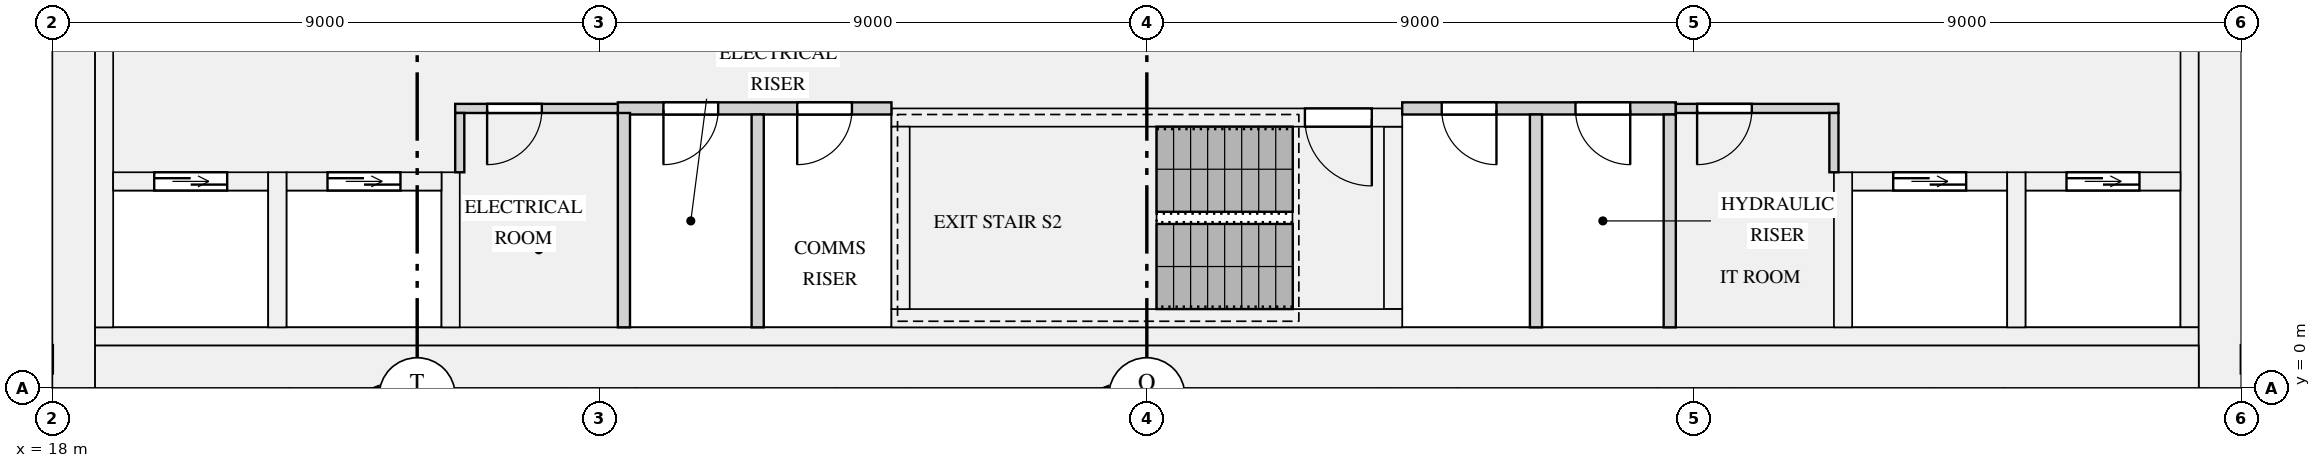
"""IFC4 building model, lengths in metres.
Left out: names, types, materials, properties, quantities, classifications, styles, units other than length and angle.
Written with IfcOpenShell. Run it as: python <this file> out.ifc"""

import sys

from ifc_helpers import new_model, si_unit, direction, frame, frame_2d, origin, place, context, subcontext, project, spatial, rectangle, extrude, element, fill, save


model = new_model("IFC4")
c1 = context("Model", 3, precision=1e-05, world=origin(), true_north=direction((0.0, 1.0)))
c2 = subcontext(c1, "Body", "Model", "MODEL_VIEW")
j1 = project(units=[si_unit("LENGTHUNIT", "METRE"), si_unit("PLANEANGLEUNIT", "RADIAN")], contexts=[c1])
p1 = place(None, origin())
s1 = spatial("IfcSite", under=j1, at=p1, CompositionType="ELEMENT")
p2 = place(p1, origin())
s2 = spatial("IfcBuilding", under=s1, at=p2, CompositionType="ELEMENT")
p3 = place(p2, frame((0.0, 0.0, 144.45)))
s3 = spatial("IfcBuildingStorey", under=s2, at=p3, CompositionType="ELEMENT", Elevation=144.45)
for number, where, z_axis, x_axis in (
    (1, (18.35, 0.0, 0.0), (0.0, 0.0, 1.0), (0.0, 1.0, 0.0)),
    (2, (53.65, 0.0, 0.0), (0.0, 0.0, 1.0), (0.0, 1.0, 0.0)),
):
    element("IfcWall", number, at=place(p3, frame(where, z_axis=z_axis, x_axis=x_axis)), inside=s3, PredefinedType="SHEAR", context=c2, shape_type="SweptSolid", body=[
        extrude(rectangle(XDim=12.5, YDim=0.7, at=frame_2d((6.25, 0.0))), origin(), (0.0, 0.0, 1.0), 3.15),
    ])
p4 = place(p3, frame((18.7, 0.35, 0.0), z_axis=(0.0, 0.0, 1.0), x_axis=(1.0, 0.0, 0.0)))
e3 = element("IfcWall", 3, at=p4, inside=s3, PredefinedType="SHEAR", context=c2, shape_type="SweptSolid", body=[
    extrude(rectangle(XDim=34.6, YDim=0.7, at=frame_2d((17.3, 0.0))), origin(), (0.0, 0.0, 1.0), 3.15),
])
for number, where, z_axis, x_axis in (
    (4, (18.85, 1.0, 0.0), (0.0, 0.0, 1.0), (0.0, 1.0, 0.0)),
    (5, (53.15, 1.0, 0.0), (0.0, 0.0, 1.0), (0.0, 1.0, 0.0)),
):
    element("IfcWall", number, at=place(p3, frame(where, z_axis=z_axis, x_axis=x_axis)), inside=s3, PredefinedType="SHEAR", context=c2, shape_type="SweptSolid", body=[
        extrude(rectangle(XDim=10.9, YDim=0.3, at=frame_2d((5.45, 0.0))), origin(), (0.0, 0.0, 1.0), 3.15),
    ])
p5 = place(p3, frame((18.7, 0.85, 0.0), z_axis=(0.0, 0.0, 1.0), x_axis=(1.0, 0.0, 0.0)))
e6 = element("IfcWall", 6, at=p5, inside=s3, PredefinedType="SHEAR", context=c2, shape_type="SweptSolid", body=[
    extrude(rectangle(XDim=34.6, YDim=0.3, at=frame_2d((17.3, 0.0))), origin(), (0.0, 0.0, 1.0), 3.15),
])
p6 = place(p3, frame((19.0, 3.4, 0.0), z_axis=(0.0, 0.0, 1.0), x_axis=(1.0, 0.0, 0.0)))
e7 = element("IfcWall", 7, at=p6, inside=s3, PredefinedType="SHEAR", context=c2, shape_type="SweptSolid", body=[
    extrude(rectangle(XDim=2.55, YDim=0.3, at=frame_2d((1.275, 0.0))), origin(), (0.0, 0.0, 1.0), 3.15),
])
p7 = place(p6, frame((0.675, 0.0, 0.0)))
e8 = element("IfcOpeningElement", 8, at=p7, cuts=e7, PredefinedType="OPENING", context=c2, shape_type="SweptSolid", body=[
    extrude(rectangle(XDim=1.2, YDim=2.1, at=frame_2d((0.6, 1.05))), frame((0.0, 0.16, 0.0), z_axis=(0.0, -1.0, 0.0), x_axis=(1.0, 0.0, 0.0)), (0.0, 0.0, 1.0), 0.32),
])
p8 = place(p3, frame((21.85, 3.4, 0.0), z_axis=(0.0, 0.0, 1.0), x_axis=(1.0, 0.0, 0.0)))
e9 = element("IfcWall", 9, at=p8, inside=s3, PredefinedType="SHEAR", context=c2, shape_type="SweptSolid", body=[
    extrude(rectangle(XDim=2.55, YDim=0.3, at=frame_2d((1.275, 0.0))), origin(), (0.0, 0.0, 1.0), 3.15),
])
p9 = place(p8, frame((0.675, 0.0, 0.0)))
e10 = element("IfcOpeningElement", 10, at=p9, cuts=e9, PredefinedType="OPENING", context=c2, shape_type="SweptSolid", body=[
    extrude(rectangle(XDim=1.2, YDim=2.1, at=frame_2d((0.6, 1.05))), frame((0.0, 0.16, 0.0), z_axis=(0.0, -1.0, 0.0), x_axis=(1.0, 0.0, 0.0)), (0.0, 0.0, 1.0), 0.32),
])
for number, where, z_axis, x_axis in (
    (11, (21.7, 1.0, 0.0), (0.0, 0.0, 1.0), (0.0, 1.0, 0.0)),
    (12, (24.55, 1.0, 0.0), (0.0, 0.0, 1.0), (0.0, 1.0, 0.0)),
):
    element("IfcWall", number, at=place(p3, frame(where, z_axis=z_axis, x_axis=x_axis)), inside=s3, PredefinedType="SHEAR", context=c2, shape_type="SweptSolid", body=[
        extrude(rectangle(XDim=2.55, YDim=0.3, at=frame_2d((1.275, 0.0))), origin(), (0.0, 0.0, 1.0), 3.15),
    ])
p10 = place(p3, frame((47.6, 3.4, 0.0), z_axis=(0.0, 0.0, 1.0), x_axis=(1.0, 0.0, 0.0)))
e13 = element("IfcWall", 13, at=p10, inside=s3, PredefinedType="SHEAR", context=c2, shape_type="SweptSolid", body=[
    extrude(rectangle(XDim=2.55, YDim=0.3, at=frame_2d((1.275, 0.0))), origin(), (0.0, 0.0, 1.0), 3.15),
])
p11 = place(p10, frame((0.675, 0.0, 0.0)))
e14 = element("IfcOpeningElement", 14, at=p11, cuts=e13, PredefinedType="OPENING", context=c2, shape_type="SweptSolid", body=[
    extrude(rectangle(XDim=1.2, YDim=2.1, at=frame_2d((0.6, 1.05))), frame((0.0, 0.16, 0.0), z_axis=(0.0, -1.0, 0.0), x_axis=(1.0, 0.0, 0.0)), (0.0, 0.0, 1.0), 0.32),
])
p12 = place(p3, frame((47.45, 1.0, 0.0), z_axis=(0.0, 0.0, 1.0), x_axis=(0.0, 1.0, 0.0)))
e15 = element("IfcWall", 15, at=p12, inside=s3, PredefinedType="SHEAR", context=c2, shape_type="SweptSolid", body=[
    extrude(rectangle(XDim=2.55, YDim=0.3, at=frame_2d((1.275, 0.0))), origin(), (0.0, 0.0, 1.0), 3.15),
])
p13 = place(p3, frame((50.45, 3.4, 0.0), z_axis=(0.0, 0.0, 1.0), x_axis=(1.0, 0.0, 0.0)))
e16 = element("IfcWall", 16, at=p13, inside=s3, PredefinedType="SHEAR", context=c2, shape_type="SweptSolid", body=[
    extrude(rectangle(XDim=2.55, YDim=0.3, at=frame_2d((1.275, 0.0))), origin(), (0.0, 0.0, 1.0), 3.15),
])
p14 = place(p13, frame((0.675, 0.0, 0.0)))
e17 = element("IfcOpeningElement", 17, at=p14, cuts=e16, PredefinedType="OPENING", context=c2, shape_type="SweptSolid", body=[
    extrude(rectangle(XDim=1.2, YDim=2.1, at=frame_2d((0.6, 1.05))), frame((0.0, 0.16, 0.0), z_axis=(0.0, -1.0, 0.0), x_axis=(1.0, 0.0, 0.0)), (0.0, 0.0, 1.0), 0.32),
])
p15 = place(p3, frame((50.3, 1.0, 0.0), z_axis=(0.0, 0.0, 1.0), x_axis=(0.0, 1.0, 0.0)))
e18 = element("IfcWall", 18, at=p15, inside=s3, PredefinedType="SHEAR", context=c2, shape_type="SweptSolid", body=[
    extrude(rectangle(XDim=2.55, YDim=0.3, at=frame_2d((1.275, 0.0))), origin(), (0.0, 0.0, 1.0), 3.15),
])
p16 = place(p3, frame((31.8, 1.15, 0.0), z_axis=(0.0, 0.0, 1.0), x_axis=(1.0, 0.0, 0.0)))
e19 = element("IfcWall", 19, at=p16, inside=s3, PredefinedType="SHEAR", context=c2, shape_type="SweptSolid", body=[
    extrude(rectangle(XDim=8.4, YDim=0.3, at=frame_2d((4.2, 0.0))), origin(), (0.0, 0.0, 1.0), 3.15),
])
p17 = place(p3, frame((31.8, 4.45, 0.0), z_axis=(0.0, 0.0, 1.0), x_axis=(1.0, 0.0, 0.0)))
e20 = element("IfcWall", 20, at=p17, inside=s3, PredefinedType="SHEAR", context=c2, shape_type="SweptSolid", body=[
    extrude(rectangle(XDim=8.4, YDim=0.3, at=frame_2d((4.2, 0.0))), origin(), (0.0, 0.0, 1.0), 3.15),
])
p18 = place(p17, frame((6.8, 0.0, 0.0)))
e21 = element("IfcOpeningElement", 21, at=p18, cuts=e20, PredefinedType="OPENING", context=c2, shape_type="SweptSolid", body=[
    extrude(rectangle(XDim=1.1, YDim=2.1, at=frame_2d((0.55, 1.05))), frame((0.0, 0.16, 0.0), z_axis=(0.0, -1.0, 0.0), x_axis=(1.0, 0.0, 0.0)), (0.0, 0.0, 1.0), 0.32),
])
for number, where, z_axis, x_axis in (
    (22, (31.95, 1.3, 0.0), (0.0, 0.0, 1.0), (0.0, 1.0, 0.0)),
    (23, (40.05, 1.3, 0.0), (0.0, 0.0, 1.0), (0.0, 1.0, 0.0)),
):
    element("IfcWall", number, at=place(p3, frame(where, z_axis=z_axis, x_axis=x_axis)), inside=s3, PredefinedType="SHEAR", context=c2, shape_type="SweptSolid", body=[
        extrude(rectangle(XDim=3.0, YDim=0.3, at=frame_2d((1.5, 0.0))), origin(), (0.0, 0.0, 1.0), 3.15),
    ])
p19 = place(p3, frame((27.3, 4.6, 0.0), z_axis=(0.0, 0.0, 1.0), x_axis=(1.0, 0.0, 0.0)))
e24 = element("IfcWall", 24, at=p19, inside=s3, PredefinedType="PARTITIONING", context=c2, shape_type="SweptSolid", body=[
    extrude(rectangle(XDim=4.5, YDim=0.2, at=frame_2d((2.25, 0.0))), origin(), (0.0, 0.0, 1.0), 2.83),
])
p20 = place(p19, frame((0.75, 0.0, 0.0)))
e25 = element("IfcOpeningElement", 25, at=p20, cuts=e24, PredefinedType="OPENING", context=c2, shape_type="SweptSolid", body=[
    extrude(rectangle(XDim=0.9, YDim=2.1, at=frame_2d((0.45, 1.05))), frame((0.0, 0.11, 0.0), z_axis=(0.0, -1.0, 0.0), x_axis=(1.0, 0.0, 0.0)), (0.0, 0.0, 1.0), 0.22),
])
p21 = place(p19, frame((2.95, 0.0, 0.0)))
e26 = element("IfcOpeningElement", 26, at=p21, cuts=e24, PredefinedType="OPENING", context=c2, shape_type="SweptSolid", body=[
    extrude(rectangle(XDim=0.9, YDim=2.1, at=frame_2d((0.45, 1.05))), frame((0.0, 0.11, 0.0), z_axis=(0.0, -1.0, 0.0), x_axis=(1.0, 0.0, 0.0)), (0.0, 0.0, 1.0), 0.22),
])
p22 = place(p3, frame((40.2, 4.6, 0.0), z_axis=(0.0, 0.0, 1.0), x_axis=(1.0, 0.0, 0.0)))
e27 = element("IfcWall", 27, at=p22, inside=s3, PredefinedType="PARTITIONING", context=c2, shape_type="SweptSolid", body=[
    extrude(rectangle(XDim=4.5, YDim=0.2, at=frame_2d((2.25, 0.0))), origin(), (0.0, 0.0, 1.0), 2.83),
])
p23 = place(p22, frame((0.65, 0.0, 0.0)))
e28 = element("IfcOpeningElement", 28, at=p23, cuts=e27, PredefinedType="OPENING", context=c2, shape_type="SweptSolid", body=[
    extrude(rectangle(XDim=0.9, YDim=2.1, at=frame_2d((0.45, 1.05))), frame((0.0, 0.11, 0.0), z_axis=(0.0, -1.0, 0.0), x_axis=(1.0, 0.0, 0.0)), (0.0, 0.0, 1.0), 0.22),
])
p24 = place(p22, frame((2.85, 0.0, 0.0)))
e29 = element("IfcOpeningElement", 29, at=p24, cuts=e27, PredefinedType="OPENING", context=c2, shape_type="SweptSolid", body=[
    extrude(rectangle(XDim=0.9, YDim=2.1, at=frame_2d((0.45, 1.05))), frame((0.0, 0.11, 0.0), z_axis=(0.0, -1.0, 0.0), x_axis=(1.0, 0.0, 0.0)), (0.0, 0.0, 1.0), 0.22),
])
p25 = place(p3, frame((24.625, 4.6, 0.0), z_axis=(0.0, 0.0, 1.0), x_axis=(1.0, 0.0, 0.0)))
e30 = element("IfcWall", 30, at=p25, inside=s3, PredefinedType="PARTITIONING", context=c2, shape_type="SweptSolid", body=[
    extrude(rectangle(XDim=2.675, YDim=0.15, at=frame_2d((1.337, 0.0))), origin(), (0.0, 0.0, 1.0), 2.83),
])
p26 = place(p25, frame((0.525, 0.0, 0.0)))
e31 = element("IfcOpeningElement", 31, at=p26, cuts=e30, PredefinedType="OPENING", context=c2, shape_type="SweptSolid", body=[
    extrude(rectangle(XDim=0.9, YDim=2.1, at=frame_2d((0.45, 1.05))), frame((0.0, 0.085, 0.0), z_axis=(0.0, -1.0, 0.0), x_axis=(1.0, 0.0, 0.0)), (0.0, 0.0, 1.0), 0.17),
])
p27 = place(p3, frame((44.7, 4.6, 0.0), z_axis=(0.0, 0.0, 1.0), x_axis=(1.0, 0.0, 0.0)))
e32 = element("IfcWall", 32, at=p27, inside=s3, PredefinedType="PARTITIONING", context=c2, shape_type="SweptSolid", body=[
    extrude(rectangle(XDim=2.675, YDim=0.15, at=frame_2d((1.337, 0.0))), origin(), (0.0, 0.0, 1.0), 2.83),
])
p28 = place(p27, frame((0.35, 0.0, 0.0)))
e33 = element("IfcOpeningElement", 33, at=p28, cuts=e32, PredefinedType="OPENING", context=c2, shape_type="SweptSolid", body=[
    extrude(rectangle(XDim=0.9, YDim=2.1, at=frame_2d((0.45, 1.05))), frame((0.0, 0.085, 0.0), z_axis=(0.0, -1.0, 0.0), x_axis=(1.0, 0.0, 0.0)), (0.0, 0.0, 1.0), 0.17),
])
p29 = place(p3, frame((27.4, 1.0, 0.0), z_axis=(0.0, 0.0, 1.0), x_axis=(0.0, 1.0, 0.0)))
e34 = element("IfcWall", 34, at=p29, inside=s3, PredefinedType="PARTITIONING", context=c2, shape_type="SweptSolid", body=[
    extrude(rectangle(XDim=3.525, YDim=0.2, at=frame_2d((1.762, 0.0))), origin(), (0.0, 0.0, 1.0), 2.83),
])
for number, where, z_axis, x_axis in (
    (35, (29.6, 1.0, 0.0), (0.0, 0.0, 1.0), (0.0, 1.0, 0.0)),
    (36, (42.4, 1.0, 0.0), (0.0, 0.0, 1.0), (0.0, 1.0, 0.0)),
    (37, (44.6, 1.0, 0.0), (0.0, 0.0, 1.0), (0.0, 1.0, 0.0)),
):
    element("IfcWall", number, at=place(p3, frame(where, z_axis=z_axis, x_axis=x_axis)), inside=s3, PredefinedType="PARTITIONING", context=c2, shape_type="SweptSolid", body=[
        extrude(rectangle(XDim=3.5, YDim=0.2, at=frame_2d((1.75, 0.0))), origin(), (0.0, 0.0, 1.0), 2.83),
    ])
for number, where, z_axis, x_axis in (
    (38, (24.7, 3.55, 0.0), (0.0, 0.0, 1.0), (0.0, 1.0, 0.0)),
    (39, (47.3, 3.55, 0.0), (0.0, 0.0, 1.0), (0.0, 1.0, 0.0)),
):
    element("IfcWall", number, at=place(p3, frame(where, z_axis=z_axis, x_axis=x_axis)), inside=s3, PredefinedType="PARTITIONING", context=c2, shape_type="SweptSolid", body=[
        extrude(rectangle(XDim=0.975, YDim=0.15, at=frame_2d((0.487, 0.0))), origin(), (0.0, 0.0, 1.0), 2.83),
    ])
p30 = place(p7, origin())
e40 = element("IfcDoor", 40, at=p30, inside=s3, OperationType="DOUBLE_DOOR_SLIDING", PredefinedType="DOOR", context=c2, shape_type="SweptSolid", body=[
    extrude(rectangle(XDim=1.2, YDim=2.1, at=frame_2d((0.6, 1.05))), frame((0.0, 0.025, 0.0), z_axis=(0.0, -1.0, 0.0), x_axis=(1.0, 0.0, 0.0)), (0.0, 0.0, 1.0), 0.05),
])
fill(e8, e40)
p31 = place(p9, origin())
e41 = element("IfcDoor", 41, at=p31, inside=s3, OperationType="DOUBLE_DOOR_SLIDING", PredefinedType="DOOR", context=c2, shape_type="SweptSolid", body=[
    extrude(rectangle(XDim=1.2, YDim=2.1, at=frame_2d((0.6, 1.05))), frame((0.0, 0.025, 0.0), z_axis=(0.0, -1.0, 0.0), x_axis=(1.0, 0.0, 0.0)), (0.0, 0.0, 1.0), 0.05),
])
fill(e10, e41)
p32 = place(p11, origin())
e42 = element("IfcDoor", 42, at=p32, inside=s3, OperationType="DOUBLE_DOOR_SLIDING", PredefinedType="DOOR", context=c2, shape_type="SweptSolid", body=[
    extrude(rectangle(XDim=1.2, YDim=2.1, at=frame_2d((0.6, 1.05))), frame((0.0, 0.025, 0.0), z_axis=(0.0, -1.0, 0.0), x_axis=(1.0, 0.0, 0.0)), (0.0, 0.0, 1.0), 0.05),
])
fill(e14, e42)
p33 = place(p14, origin())
e43 = element("IfcDoor", 43, at=p33, inside=s3, OperationType="DOUBLE_DOOR_SLIDING", PredefinedType="DOOR", context=c2, shape_type="SweptSolid", body=[
    extrude(rectangle(XDim=1.2, YDim=2.1, at=frame_2d((0.6, 1.05))), frame((0.0, 0.025, 0.0), z_axis=(0.0, -1.0, 0.0), x_axis=(1.0, 0.0, 0.0)), (0.0, 0.0, 1.0), 0.05),
])
fill(e17, e43)
p34 = place(p18, frame((1.1, 0.0, 0.0), z_axis=(0.0, 0.0, 1.0), x_axis=(-1.0, 0.0, 0.0)))
e44 = element("IfcDoor", 44, at=p34, inside=s3, OperationType="SINGLE_SWING_LEFT", PredefinedType="DOOR", context=c2, shape_type="SweptSolid", body=[
    extrude(rectangle(XDim=1.1, YDim=2.1, at=frame_2d((0.55, 1.05))), frame((0.0, 0.025, 0.0), z_axis=(0.0, -1.0, 0.0), x_axis=(1.0, 0.0, 0.0)), (0.0, 0.0, 1.0), 0.05),
])
fill(e21, e44)
p35 = place(p26, frame((0.9, 0.0, 0.0), z_axis=(0.0, 0.0, 1.0), x_axis=(-1.0, 0.0, 0.0)))
e45 = element("IfcDoor", 45, at=p35, inside=s3, OperationType="SINGLE_SWING_RIGHT", PredefinedType="DOOR", context=c2, shape_type="SweptSolid", body=[
    extrude(rectangle(XDim=0.9, YDim=2.1, at=frame_2d((0.45, 1.05))), frame((0.0, 0.025, 0.0), z_axis=(0.0, -1.0, 0.0), x_axis=(1.0, 0.0, 0.0)), (0.0, 0.0, 1.0), 0.05),
])
fill(e31, e45)
p36 = place(p28, frame((0.9, 0.0, 0.0), z_axis=(0.0, 0.0, 1.0), x_axis=(-1.0, 0.0, 0.0)))
e46 = element("IfcDoor", 46, at=p36, inside=s3, OperationType="SINGLE_SWING_RIGHT", PredefinedType="DOOR", context=c2, shape_type="SweptSolid", body=[
    extrude(rectangle(XDim=0.9, YDim=2.1, at=frame_2d((0.45, 1.05))), frame((0.0, 0.025, 0.0), z_axis=(0.0, -1.0, 0.0), x_axis=(1.0, 0.0, 0.0)), (0.0, 0.0, 1.0), 0.05),
])
fill(e33, e46)
p37 = place(p20, frame((0.9, 0.0, 0.0), z_axis=(0.0, 0.0, 1.0), x_axis=(-1.0, 0.0, 0.0)))
e47 = element("IfcDoor", 47, at=p37, inside=s3, OperationType="SINGLE_SWING_RIGHT", PredefinedType="DOOR", context=c2, shape_type="SweptSolid", body=[
    extrude(rectangle(XDim=0.9, YDim=2.1, at=frame_2d((0.45, 1.05))), frame((0.0, 0.025, 0.0), z_axis=(0.0, -1.0, 0.0), x_axis=(1.0, 0.0, 0.0)), (0.0, 0.0, 1.0), 0.05),
])
fill(e25, e47)
p38 = place(p21, frame((0.9, 0.0, 0.0), z_axis=(0.0, 0.0, 1.0), x_axis=(-1.0, 0.0, 0.0)))
e48 = element("IfcDoor", 48, at=p38, inside=s3, OperationType="SINGLE_SWING_RIGHT", PredefinedType="DOOR", context=c2, shape_type="SweptSolid", body=[
    extrude(rectangle(XDim=0.9, YDim=2.1, at=frame_2d((0.45, 1.05))), frame((0.0, 0.025, 0.0), z_axis=(0.0, -1.0, 0.0), x_axis=(1.0, 0.0, 0.0)), (0.0, 0.0, 1.0), 0.05),
])
fill(e26, e48)
p39 = place(p23, frame((0.9, 0.0, 0.0), z_axis=(0.0, 0.0, 1.0), x_axis=(-1.0, 0.0, 0.0)))
e49 = element("IfcDoor", 49, at=p39, inside=s3, OperationType="SINGLE_SWING_LEFT", PredefinedType="DOOR", context=c2, shape_type="SweptSolid", body=[
    extrude(rectangle(XDim=0.9, YDim=2.1, at=frame_2d((0.45, 1.05))), frame((0.0, 0.025, 0.0), z_axis=(0.0, -1.0, 0.0), x_axis=(1.0, 0.0, 0.0)), (0.0, 0.0, 1.0), 0.05),
])
fill(e28, e49)
p40 = place(p24, frame((0.9, 0.0, 0.0), z_axis=(0.0, 0.0, 1.0), x_axis=(-1.0, 0.0, 0.0)))
e50 = element("IfcDoor", 50, at=p40, inside=s3, OperationType="SINGLE_SWING_LEFT", PredefinedType="DOOR", context=c2, shape_type="SweptSolid", body=[
    extrude(rectangle(XDim=0.9, YDim=2.1, at=frame_2d((0.45, 1.05))), frame((0.0, 0.025, 0.0), z_axis=(0.0, -1.0, 0.0), x_axis=(1.0, 0.0, 0.0)), (0.0, 0.0, 1.0), 0.05),
])
fill(e29, e50)
save(model, sys.argv[1])
